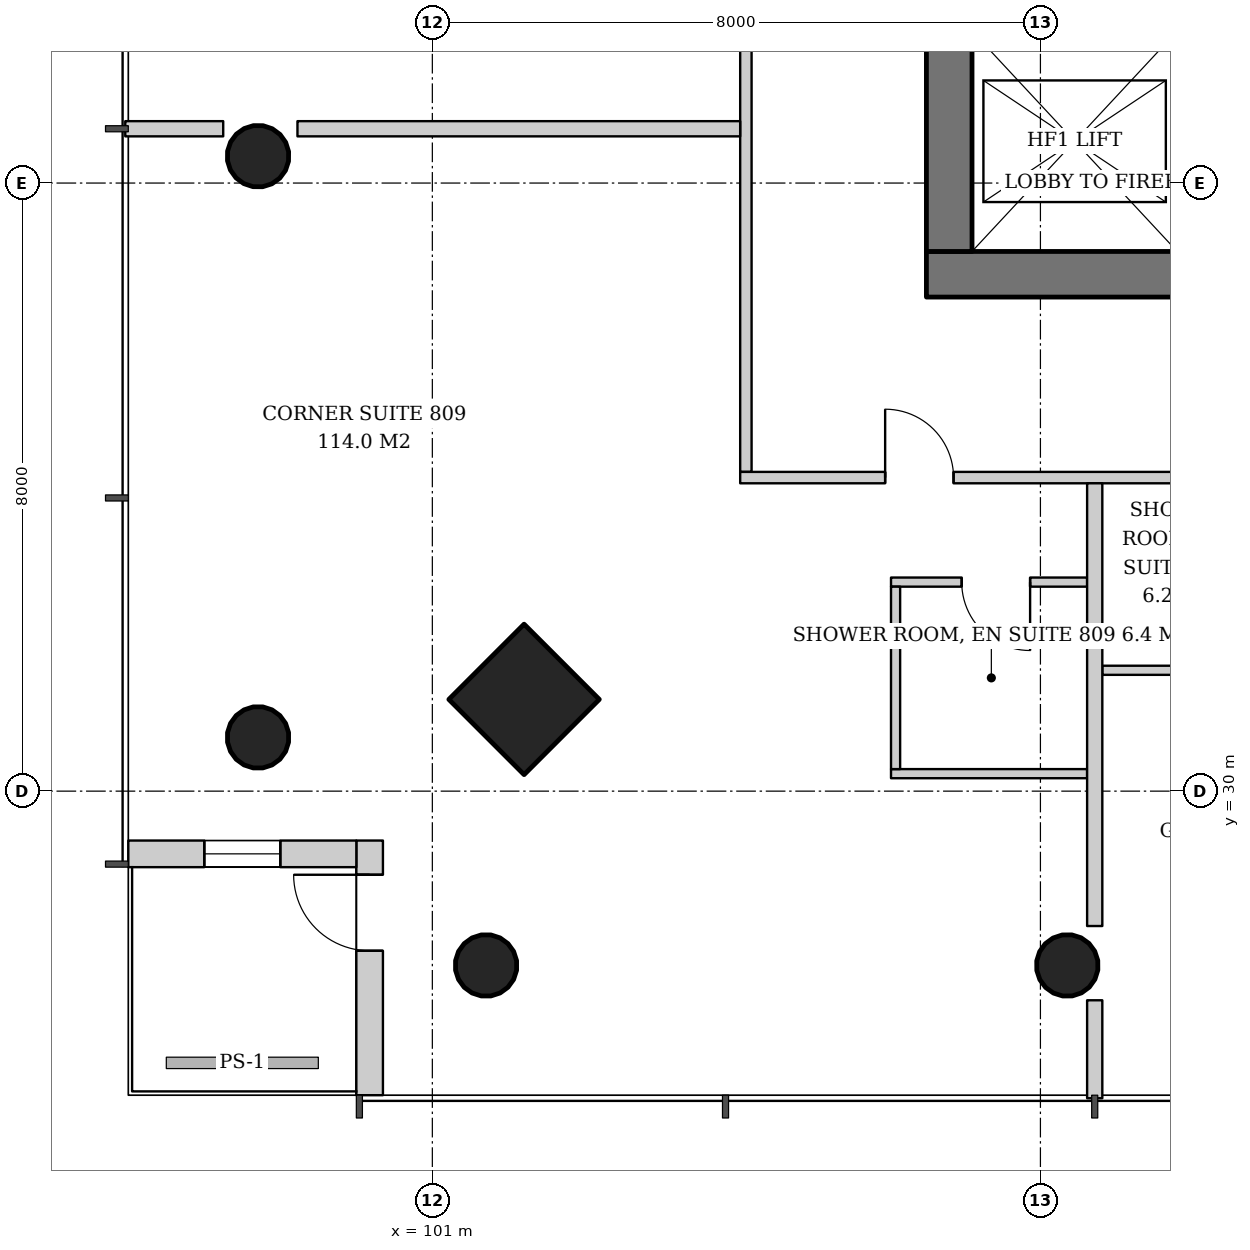
"""IFC4 building model, lengths in metres.
Left out: names, types, materials, properties, quantities, classifications, styles, units other than length and angle.
Written with IfcOpenShell. Run it as: python <this file> out.ifc"""

import sys

from ifc_helpers import new_model, si_unit, direction, frame, frame_2d, origin, origin_2d, place, context, subcontext, project, spatial, rectangle, hollow_circle, extrude, element, fill, save


model = new_model("IFC4")
c1 = context("Model", 3, precision=1e-05, world=origin(), true_north=direction((0.0, 1.0)))
c2 = subcontext(c1, "Body", "Model", "MODEL_VIEW")
j1 = project(units=[si_unit("LENGTHUNIT", "METRE"), si_unit("PLANEANGLEUNIT", "RADIAN")], contexts=[c1])
p1 = place(None, origin())
s1 = spatial("IfcSite", under=j1, at=p1, CompositionType="ELEMENT")
p2 = place(p1, origin())
s2 = spatial("IfcBuilding", under=s1, at=p2, CompositionType="ELEMENT")
p3 = place(p2, frame((0.0, 0.0, 36.2)))
s3 = spatial("IfcBuildingStorey", under=s2, at=p3, CompositionType="ELEMENT", Elevation=36.2)
p4 = place(p3, frame((102.155, 31.155, 0.0), z_axis=(0.042965756413, 0.042965756413, 0.998152236661), x_axis=(-0.707106781187, 0.707106781187, 0.0)))
e1 = element("IfcColumn", 1, at=p4, inside=s3, PredefinedType="COLUMN", context=c2, shape_type="SweptSolid", body=[
    extrude(rectangle(XDim=1.4, YDim=1.4, at=origin_2d()), origin(), (0.0, 0.0, 1.0), 3.807),
])
p5 = place(p3, frame((98.655, 30.655, 0.0), z_axis=(0.042965756413, 0.042965756413, 0.998152236661), x_axis=(-0.707106781187, 0.707106781187, 0.0)))
e2 = element("IfcColumn", 2, at=p5, inside=s3, PredefinedType="COLUMN", context=c2, shape_type="SweptSolid", body=[
    extrude(hollow_circle(Radius=0.406, WallThickness=0.03, at=origin_2d()), origin(), (0.0, 0.0, 1.0), 3.807),
])
p6 = place(p3, frame((98.655, 38.328, 0.0), z_axis=(0.042995531285, 0.021497765643, 0.998843946952), x_axis=(-0.4472135955, 0.894427191, 0.0)))
e3 = element("IfcColumn", 3, at=p6, inside=s3, PredefinedType="COLUMN", context=c2, shape_type="SweptSolid", body=[
    extrude(hollow_circle(Radius=0.406, WallThickness=0.03, at=origin_2d()), origin(), (0.0, 0.0, 1.0), 3.804),
])
p7 = place(p3, frame((101.655, 27.655, 0.0), z_axis=(0.042965756413, 0.042965756413, 0.998152236661), x_axis=(-0.707106781187, 0.707106781187, 0.0)))
e4 = element("IfcColumn", 4, at=p7, inside=s3, PredefinedType="COLUMN", context=c2, shape_type="SweptSolid", body=[
    extrude(hollow_circle(Radius=0.406, WallThickness=0.03, at=origin_2d()), origin(), (0.0, 0.0, 1.0), 3.807),
])
p8 = place(p3, frame((109.328, 27.655, 0.0), z_axis=(0.021497765643, 0.042995531285, 0.998843946952), x_axis=(-0.894427191, 0.4472135955, 0.0)))
e5 = element("IfcColumn", 5, at=p8, inside=s3, PredefinedType="COLUMN", context=c2, shape_type="SweptSolid", body=[
    extrude(hollow_circle(Radius=0.406, WallThickness=0.03, at=origin_2d()), origin(), (0.0, 0.0, 1.0), 3.804),
])
p9 = place(p3, frame((107.5, 36.8, 0.0), z_axis=(0.0, 0.0, 1.0), x_axis=(1.0, 0.0, 0.0)))
e6 = element("IfcWall", 6, at=p9, inside=s3, PredefinedType="SHEAR", context=c2, shape_type="SweptSolid", body=[
    extrude(rectangle(XDim=19.0, YDim=0.6, at=frame_2d((9.5, 0.0))), origin(), (0.0, 0.0, 1.0), 3.8),
])
p10 = place(p9, frame((3.9, 0.0, 0.0)))
e7 = element("IfcOpeningElement", 7, at=p10, cuts=e6, PredefinedType="OPENING", context=c2, shape_type="SweptSolid", body=[
    extrude(rectangle(XDim=1.0, YDim=2.1, at=frame_2d((0.5, 1.05))), frame((0.0, 0.31, 0.0), z_axis=(0.0, -1.0, 0.0), x_axis=(1.0, 0.0, 0.0)), (0.0, 0.0, 1.0), 0.62),
])
p11 = place(p9, frame((14.153, 0.0, 0.0)))
e8 = element("IfcOpeningElement", 8, at=p11, cuts=e6, PredefinedType="OPENING", context=c2, shape_type="SweptSolid", body=[
    extrude(rectangle(XDim=1.0, YDim=2.1, at=frame_2d((0.5, 1.05))), frame((0.0, 0.31, 0.0), z_axis=(0.0, -1.0, 0.0), x_axis=(1.0, 0.0, 0.0)), (0.0, 0.0, 1.0), 0.62),
])
p12 = place(p9, frame((16.2, 0.0, 0.0)))
e9 = element("IfcOpeningElement", 9, at=p12, cuts=e6, PredefinedType="OPENING", context=c2, shape_type="SweptSolid", body=[
    extrude(rectangle(XDim=1.0, YDim=2.1, at=frame_2d((0.5, 1.05))), frame((0.0, 0.31, 0.0), z_axis=(0.0, -1.0, 0.0), x_axis=(1.0, 0.0, 0.0)), (0.0, 0.0, 1.0), 0.62),
])
p13 = place(p3, frame((107.8, 37.1, 0.0), z_axis=(0.0, 0.0, 1.0), x_axis=(0.0, 1.0, 0.0)))
e10 = element("IfcWall", 10, at=p13, inside=s3, PredefinedType="SHEAR", context=c2, shape_type="SweptSolid", body=[
    extrude(rectangle(XDim=17.8, YDim=0.6, at=frame_2d((8.9, 0.0))), origin(), (0.0, 0.0, 1.0), 3.8),
])
p14 = place(p13, frame((8.0, 0.0, 0.0)))
e11 = element("IfcOpeningElement", 11, at=p14, cuts=e10, PredefinedType="OPENING", context=c2, shape_type="SweptSolid", body=[
    extrude(rectangle(XDim=1.8, YDim=2.4, at=frame_2d((0.9, 1.2))), frame((0.0, 0.31, 0.0), z_axis=(0.0, -1.0, 0.0), x_axis=(1.0, 0.0, 0.0)), (0.0, 0.0, 1.0), 0.62),
])
p15 = place(p3, frame((100.175, 26.0, 0.0), z_axis=(0.0, 0.0, 1.0), x_axis=(0.0, 1.0, 0.0)))
e12 = element("IfcWall", 12, at=p15, inside=s3, PredefinedType="SOLIDWALL", context=c2, shape_type="SweptSolid", body=[
    extrude(rectangle(XDim=3.35, YDim=0.35, at=frame_2d((1.675, 0.0))), origin(), (0.0, 0.0, 1.0), 3.6),
])
p16 = place(p15, frame((1.9, 0.0, 0.0)))
e13 = element("IfcOpeningElement", 13, at=p16, cuts=e12, PredefinedType="OPENING", context=c2, shape_type="SweptSolid", body=[
    extrude(rectangle(XDim=1.0, YDim=2.4, at=frame_2d((0.5, 1.2))), frame((0.0, 0.185, 0.0), z_axis=(0.0, -1.0, 0.0), x_axis=(1.0, 0.0, 0.0)), (0.0, 0.0, 1.0), 0.37),
])
p17 = place(p3, frame((100.0, 29.175, 0.0), z_axis=(0.0, 0.0, 1.0), x_axis=(-1.0, 0.0, 0.0)))
e14 = element("IfcWall", 14, at=p17, inside=s3, PredefinedType="SOLIDWALL", context=c2, shape_type="SweptSolid", body=[
    extrude(rectangle(XDim=3.0, YDim=0.35, at=frame_2d((1.5, 0.0))), origin(), (0.0, 0.0, 1.0), 3.6),
])
p18 = place(p17, frame((1.0, 0.0, 0.9)))
e15 = element("IfcOpeningElement", 15, at=p18, cuts=e14, PredefinedType="OPENING", context=c2, shape_type="SweptSolid", body=[
    extrude(rectangle(XDim=1.0, YDim=2.4, at=frame_2d((0.5, 1.2))), frame((0.0, 0.185, 0.0), z_axis=(0.0, -1.0, 0.0), x_axis=(1.0, 0.0, 0.0)), (0.0, 0.0, 1.0), 0.37),
])
p19 = place(p3, frame((105.125, 57.95, 0.0), z_axis=(0.0, 0.0, 1.0), x_axis=(0.0, -1.0, 0.0)))
e16 = element("IfcWall", 16, at=p19, inside=s3, PredefinedType="PARTITIONING", context=c2, shape_type="SweptSolid", body=[
    extrude(rectangle(XDim=23.75, YDim=0.15, at=frame_2d((11.875, 0.0))), origin(), (0.0, 0.0, 1.0), 2.8),
])
p20 = place(p19, frame((1.907, 0.0, 0.0)))
e17 = element("IfcOpeningElement", 17, at=p20, cuts=e16, PredefinedType="OPENING", context=c2, shape_type="SweptSolid", body=[
    extrude(rectangle(XDim=0.9, YDim=2.1, at=frame_2d((0.45, 1.05))), frame((0.0, 0.085, 0.0), z_axis=(0.0, -1.0, 0.0), x_axis=(1.0, 0.0, 0.0)), (0.0, 0.0, 1.0), 0.17),
])
p21 = place(p19, frame((7.414, 0.0, 0.0)))
e18 = element("IfcOpeningElement", 18, at=p21, cuts=e16, PredefinedType="OPENING", context=c2, shape_type="SweptSolid", body=[
    extrude(rectangle(XDim=0.9, YDim=2.1, at=frame_2d((0.45, 1.05))), frame((0.0, 0.085, 0.0), z_axis=(0.0, -1.0, 0.0), x_axis=(1.0, 0.0, 0.0)), (0.0, 0.0, 1.0), 0.17),
])
p22 = place(p19, frame((17.079, 0.0, 0.0)))
e19 = element("IfcOpeningElement", 19, at=p22, cuts=e16, PredefinedType="OPENING", context=c2, shape_type="SweptSolid", body=[
    extrude(rectangle(XDim=1.0, YDim=2.1, at=frame_2d((0.5, 1.05))), frame((0.0, 0.085, 0.0), z_axis=(0.0, -1.0, 0.0), x_axis=(1.0, 0.0, 0.0)), (0.0, 0.0, 1.0), 0.17),
])
p23 = place(p3, frame((105.05, 38.714, 0.0), z_axis=(0.0, 0.0, 1.0), x_axis=(-1.0, 0.0, 0.0)))
e20 = element("IfcWall", 20, at=p23, inside=s3, PredefinedType="PARTITIONING", context=c2, shape_type="SweptSolid", body=[
    extrude(rectangle(XDim=5.824, YDim=0.2, at=frame_2d((2.912, 0.0))), origin(), (0.0, 0.0, 1.0), 3.6),
])
p24 = place(p3, frame((98.249, 38.714, 0.0), z_axis=(0.0, 0.0, 1.0), x_axis=(-1.0, 0.0, 0.0)))
e21 = element("IfcWall", 21, at=p24, inside=s3, PredefinedType="PARTITIONING", context=c2, shape_type="SweptSolid", body=[
    extrude(rectangle(XDim=1.289, YDim=0.2, at=frame_2d((0.645, 0.0))), origin(), (0.0, 0.0, 1.0), 3.6),
])
p25 = place(p3, frame((109.614, 32.75, 0.0), z_axis=(0.0, 0.0, 1.0), x_axis=(-1.0, 0.0, 0.0)))
e22 = element("IfcWall", 22, at=p25, inside=s3, PredefinedType="PARTITIONING", context=c2, shape_type="SweptSolid", body=[
    extrude(rectangle(XDim=2.58, YDim=0.12, at=frame_2d((1.29, 0.0))), origin(), (0.0, 0.0, 1.0), 2.8),
])
p26 = place(p25, frame((0.75, 0.0, 0.0)))
e23 = element("IfcOpeningElement", 23, at=p26, cuts=e22, PredefinedType="OPENING", context=c2, shape_type="SweptSolid", body=[
    extrude(rectangle(XDim=0.9, YDim=2.1, at=frame_2d((0.45, 1.05))), frame((0.0, 0.07, 0.0), z_axis=(0.0, -1.0, 0.0), x_axis=(1.0, 0.0, 0.0)), (0.0, 0.0, 1.0), 0.14),
])
p27 = place(p3, frame((109.614, 30.23, 0.0), z_axis=(0.0, 0.0, 1.0), x_axis=(-1.0, 0.0, 0.0)))
e24 = element("IfcWall", 24, at=p27, inside=s3, PredefinedType="PARTITIONING", context=c2, shape_type="SweptSolid", body=[
    extrude(rectangle(XDim=2.58, YDim=0.12, at=frame_2d((1.29, 0.0))), origin(), (0.0, 0.0, 1.0), 2.8),
])
p28 = place(p3, frame((107.094, 32.69, 0.0), z_axis=(0.0, 0.0, 1.0), x_axis=(0.0, -1.0, 0.0)))
e25 = element("IfcWall", 25, at=p28, inside=s3, PredefinedType="PARTITIONING", context=c2, shape_type="SweptSolid", body=[
    extrude(rectangle(XDim=2.4, YDim=0.12, at=frame_2d((1.2, 0.0))), origin(), (0.0, 0.0, 1.0), 2.847),
])
p29 = place(p3, frame((109.814, 31.59, 0.0), z_axis=(0.0, 0.0, 1.0), x_axis=(1.0, 0.0, 0.0)))
e26 = element("IfcWall", 26, at=p29, inside=s3, PredefinedType="PARTITIONING", context=c2, shape_type="SweptSolid", body=[
    extrude(rectangle(XDim=2.42, YDim=0.12, at=frame_2d((1.21, 0.0))), origin(), (0.0, 0.0, 1.0), 2.847),
])
p30 = place(p3, frame((105.05, 34.125, 0.0), z_axis=(0.0, 0.0, 1.0), x_axis=(1.0, 0.0, 0.0)))
e27 = element("IfcWall", 27, at=p30, inside=s3, PredefinedType="PARTITIONING", context=c2, shape_type="SweptSolid", body=[
    extrude(rectangle(XDim=23.75, YDim=0.15, at=frame_2d((11.875, 0.0))), origin(), (0.0, 0.0, 1.0), 2.8),
])
p31 = place(p30, frame((1.907, 0.0, 0.0)))
e28 = element("IfcOpeningElement", 28, at=p31, cuts=e27, PredefinedType="OPENING", context=c2, shape_type="SweptSolid", body=[
    extrude(rectangle(XDim=0.9, YDim=2.1, at=frame_2d((0.45, 1.05))), frame((0.0, 0.085, 0.0), z_axis=(0.0, -1.0, 0.0), x_axis=(1.0, 0.0, 0.0)), (0.0, 0.0, 1.0), 0.17),
])
p32 = place(p30, frame((7.414, 0.0, 0.0)))
e29 = element("IfcOpeningElement", 29, at=p32, cuts=e27, PredefinedType="OPENING", context=c2, shape_type="SweptSolid", body=[
    extrude(rectangle(XDim=0.9, YDim=2.1, at=frame_2d((0.45, 1.05))), frame((0.0, 0.085, 0.0), z_axis=(0.0, -1.0, 0.0), x_axis=(1.0, 0.0, 0.0)), (0.0, 0.0, 1.0), 0.17),
])
p33 = place(p30, frame((12.271, 0.0, 0.0)))
e30 = element("IfcOpeningElement", 30, at=p33, cuts=e27, PredefinedType="OPENING", context=c2, shape_type="SweptSolid", body=[
    extrude(rectangle(XDim=0.9, YDim=2.1, at=frame_2d((0.45, 1.05))), frame((0.0, 0.085, 0.0), z_axis=(0.0, -1.0, 0.0), x_axis=(1.0, 0.0, 0.0)), (0.0, 0.0, 1.0), 0.17),
])
p34 = place(p3, frame((109.714, 34.05, 0.0), z_axis=(0.0, 0.0, 1.0), x_axis=(0.0, -1.0, 0.0)))
e31 = element("IfcWall", 31, at=p34, inside=s3, PredefinedType="PARTITIONING", context=c2, shape_type="SweptSolid", body=[
    extrude(rectangle(XDim=5.824, YDim=0.2, at=frame_2d((2.912, 0.0))), origin(), (0.0, 0.0, 1.0), 3.6),
])
p35 = place(p3, frame((109.714, 27.249, 0.0), z_axis=(0.0, 0.0, 1.0), x_axis=(0.0, -1.0, 0.0)))
e32 = element("IfcWall", 32, at=p35, inside=s3, PredefinedType="PARTITIONING", context=c2, shape_type="SweptSolid", body=[
    extrude(rectangle(XDim=1.289, YDim=0.2, at=frame_2d((0.645, 0.0))), origin(), (0.0, 0.0, 1.0), 3.6),
])
p36 = place(p16, origin())
e33 = element("IfcDoor", 33, at=p36, inside=s3, OperationType="SINGLE_SWING_RIGHT", PredefinedType="DOOR", context=c2, shape_type="SweptSolid", body=[
    extrude(rectangle(XDim=1.0, YDim=2.4, at=frame_2d((0.5, 1.2))), frame((0.0, 0.025, 0.0), z_axis=(0.0, -1.0, 0.0), x_axis=(1.0, 0.0, 0.0)), (0.0, 0.0, 1.0), 0.05),
])
fill(e13, e33)
p37 = place(p18, origin())
e34 = element("IfcWindow", 34, at=p37, inside=s3, PartitioningType="SINGLE_PANEL", PredefinedType="WINDOW", context=c2, shape_type="SweptSolid", body=[
    extrude(rectangle(XDim=1.0, YDim=2.4, at=frame_2d((0.5, 1.2))), frame((0.0, 0.03, 0.0), z_axis=(0.0, -1.0, 0.0), x_axis=(1.0, 0.0, 0.0)), (0.0, 0.0, 1.0), 0.06),
])
fill(e15, e34)
p38 = place(p26, origin())
e35 = element("IfcDoor", 35, at=p38, inside=s3, OperationType="SINGLE_SWING_LEFT", PredefinedType="DOOR", context=c2, shape_type="SweptSolid", body=[
    extrude(rectangle(XDim=0.9, YDim=2.1, at=frame_2d((0.45, 1.05))), frame((0.0, 0.025, 0.0), z_axis=(0.0, -1.0, 0.0), x_axis=(1.0, 0.0, 0.0)), (0.0, 0.0, 1.0), 0.05),
])
fill(e23, e35)
p39 = place(p31, origin())
e36 = element("IfcDoor", 36, at=p39, inside=s3, OperationType="SINGLE_SWING_LEFT", PredefinedType="DOOR", context=c2, shape_type="SweptSolid", body=[
    extrude(rectangle(XDim=0.9, YDim=2.1, at=frame_2d((0.45, 1.05))), frame((0.0, 0.025, 0.0), z_axis=(0.0, -1.0, 0.0), x_axis=(1.0, 0.0, 0.0)), (0.0, 0.0, 1.0), 0.05),
])
fill(e28, e36)
save(model, sys.argv[1])
